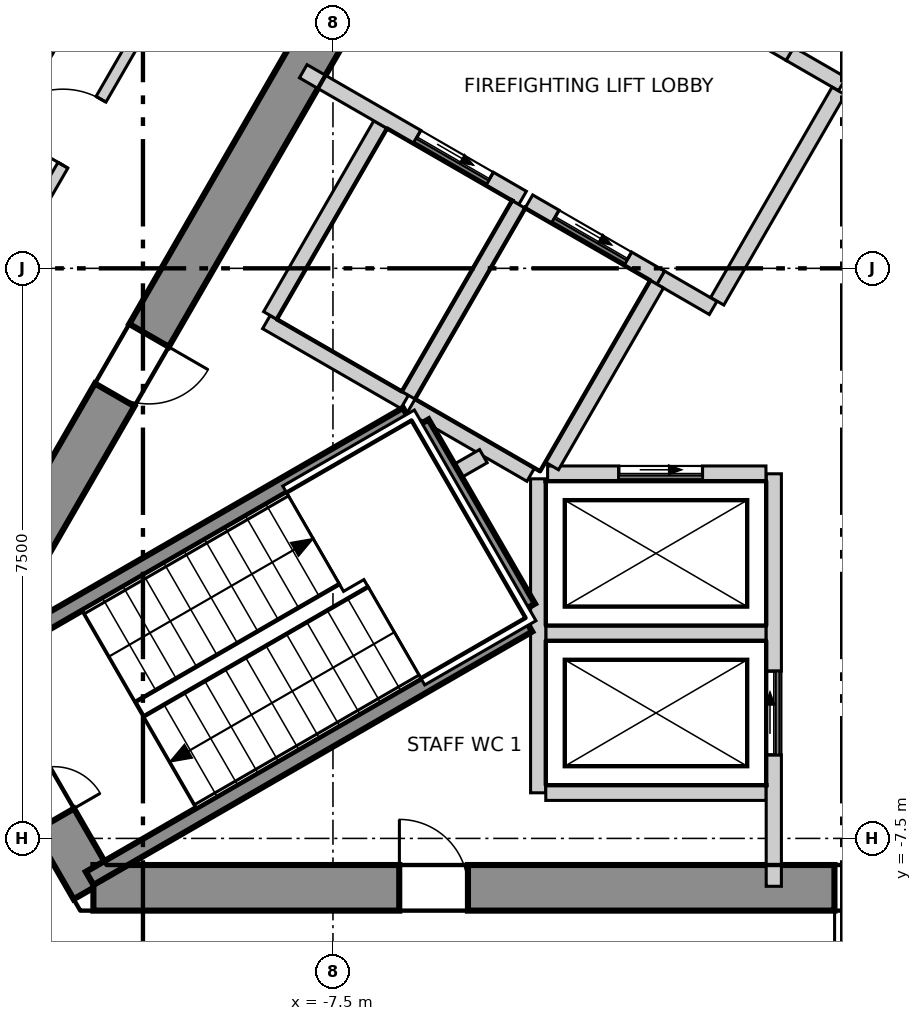
"""IFC4 building model, lengths in metres.
Left out: names, types, materials, properties, quantities, classifications, styles, units other than length and angle.
Written with IfcOpenShell. Run it as: python <this file> out.ifc"""

import sys

from ifc_helpers import new_model, si_unit, direction, frame, frame_2d, origin, place, context, subcontext, project, spatial, polyline, rectangle, outline, extrude, element, fill, save


model = new_model("IFC4")
c1 = context("Model", 3, precision=1e-05, world=origin(), true_north=direction((0.0, 1.0)))
c2 = subcontext(c1, "Body", "Model", "MODEL_VIEW")
j1 = project(units=[si_unit("LENGTHUNIT", "METRE"), si_unit("PLANEANGLEUNIT", "RADIAN")], contexts=[c1])
p1 = place(None, origin())
s1 = spatial("IfcSite", under=j1, at=p1, CompositionType="ELEMENT")
p2 = place(p1, origin())
s2 = spatial("IfcBuilding", under=s1, at=p2, CompositionType="ELEMENT")
p3 = place(p2, frame((0.0, 0.0, 300.7)))
s3 = spatial("IfcBuildingStorey", under=s2, at=p3, CompositionType="ELEMENT", Elevation=300.7)
p4 = place(p3, frame((-1.732, 13.3, -0.3), z_axis=(0.0, 0.0, 1.0), x_axis=(-0.500000539815, -0.866025092122, 0.0)))
e1 = element("IfcWall", 1, at=p4, inside=s3, PredefinedType="SHEAR", context=c2, shape_type="SweptSolid", body=[
    extrude(outline(polyline([(-0.173, -0.3), (1.795, -0.3), (3.763, -0.3), (5.732, -0.3), (7.7, -0.3), (9.668, -0.301), (11.637, -0.301), (13.605, -0.301), (15.573, -0.301), (17.542, -0.301), (19.51, -0.301), (21.478, -0.301), (21.131, 0.3), (19.226, 0.3), (17.321, 0.3), (15.415, 0.3), (13.51, 0.3), (11.605, 0.3), (9.699, 0.3), (7.794, 0.3), (5.889, 0.3), (3.984, 0.3), (2.078, 0.3), (0.173, 0.3), (-0.173, -0.3)])), origin(), (0.0, 0.0, 1.0), 3.6),
])
p5 = place(p4, frame((10.102, 0.0, 0.3)))
e2 = element("IfcOpeningElement", 2, at=p5, cuts=e1, PredefinedType="OPENING", context=c2, shape_type="SweptSolid", body=[
    extrude(rectangle(XDim=1.1, YDim=2.1, at=frame_2d((0.55, 1.05))), frame((0.0, 0.31, 0.0), z_axis=(0.0, -1.0, 0.0), x_axis=(1.0, 0.0, 0.0)), (0.0, 0.0, 1.0), 0.621),
])
p6 = place(p4, frame((16.378, 0.0, 0.3)))
e3 = element("IfcOpeningElement", 3, at=p6, cuts=e1, PredefinedType="OPENING", context=c2, shape_type="SweptSolid", body=[
    extrude(rectangle(XDim=0.9, YDim=2.1, at=frame_2d((0.45, 1.05))), frame((0.0, 0.31, 0.0), z_axis=(0.0, -1.0, 0.0), x_axis=(1.0, 0.0, 0.0)), (0.0, 0.0, 1.0), 0.621),
])
p7 = place(p4, frame((4.026, 0.0, 0.3)))
e4 = element("IfcOpeningElement", 4, at=p7, cuts=e1, PredefinedType="OPENING", context=c2, shape_type="SweptSolid", body=[
    extrude(rectangle(XDim=0.9, YDim=2.1, at=frame_2d((0.45, 1.05))), frame((0.0, 0.31, 0.0), z_axis=(0.0, -1.0, 0.0), x_axis=(1.0, 0.0, 0.0)), (0.0, 0.0, 1.0), 0.621),
])
p8 = place(p3, frame((-12.384, -5.15, -0.3), z_axis=(0.0, 0.0, 1.0), x_axis=(0.49997462182, -0.866040055388, 0.0)))
e5 = element("IfcWall", 5, at=p8, inside=s3, PredefinedType="SHEAR", context=c2, shape_type="SweptSolid", body=[
    extrude(outline(polyline([(-0.173, -0.301), (1.732, -0.301), (3.637, -0.3), (3.291, 0.3), (1.732, 0.3), (0.173, 0.3), (-0.173, -0.301)])), origin(), (0.0, 0.0, 1.0), 3.6),
])
p9 = place(p8, frame((1.032, 0.0, 0.3)))
e6 = element("IfcOpeningElement", 6, at=p9, cuts=e5, PredefinedType="OPENING", context=c2, shape_type="SweptSolid", body=[
    extrude(rectangle(XDim=1.4, YDim=2.1, at=frame_2d((0.7, 1.05))), frame((0.0, 0.31, 0.0), z_axis=(0.0, -1.0, 0.0), x_axis=(1.0, 0.0, 0.0)), (0.0, 0.0, 1.0), 0.621),
])
p10 = place(p3, frame((-10.652, -8.15, -0.3), z_axis=(0.0, 0.0, 1.0), x_axis=(1.0, 0.0, 0.0)))
e7 = element("IfcWall", 7, at=p10, inside=s3, PredefinedType="SHEAR", context=c2, shape_type="SweptSolid", body=[
    extrude(outline(polyline([(-0.173, -0.3), (1.795, -0.3), (3.763, -0.3), (5.731, -0.3), (7.7, -0.3), (9.668, -0.3), (11.636, -0.3), (13.604, -0.3), (15.573, -0.3), (17.541, -0.3), (19.509, -0.3), (21.477, -0.3), (21.131, 0.3), (19.226, 0.3), (17.321, 0.3), (15.415, 0.3), (13.51, 0.3), (11.605, 0.3), (9.699, 0.3), (7.794, 0.3), (5.889, 0.3), (3.984, 0.3), (2.078, 0.3), (0.173, 0.3), (-0.173, -0.3)])), origin(), (0.0, 0.0, 1.0), 3.6),
])
p11 = place(p10, frame((9.752, 0.0, 0.3)))
e8 = element("IfcOpeningElement", 8, at=p11, cuts=e7, PredefinedType="OPENING", context=c2, shape_type="SweptSolid", body=[
    extrude(rectangle(XDim=1.8, YDim=2.1, at=frame_2d((0.9, 1.05))), frame((0.0, 0.31, 0.0), z_axis=(0.0, -1.0, 0.0), x_axis=(1.0, 0.0, 0.0)), (0.0, 0.0, 1.0), 0.62),
])
p12 = place(p10, frame((4.026, 0.0, 0.3)))
e9 = element("IfcOpeningElement", 9, at=p12, cuts=e7, PredefinedType="OPENING", context=c2, shape_type="SweptSolid", body=[
    extrude(rectangle(XDim=0.9, YDim=2.1, at=frame_2d((0.45, 1.05))), frame((0.0, 0.31, 0.0), z_axis=(0.0, -1.0, 0.0), x_axis=(1.0, 0.0, 0.0)), (0.0, 0.0, 1.0), 0.62),
])
p13 = place(p10, frame((16.378, 0.0, 0.3)))
e10 = element("IfcOpeningElement", 10, at=p13, cuts=e7, PredefinedType="OPENING", context=c2, shape_type="SweptSolid", body=[
    extrude(rectangle(XDim=0.9, YDim=2.1, at=frame_2d((0.45, 1.05))), frame((0.0, 0.31, 0.0), z_axis=(0.0, -1.0, 0.0), x_axis=(1.0, 0.0, 0.0)), (0.0, 0.0, 1.0), 0.62),
])
p14 = place(p3, frame((-2.453, 27.405, 0.0), z_axis=(0.0, 0.0, 1.0), x_axis=(-0.500000041859, -0.866025379617, 0.0)))
e11 = element("IfcWall", 11, at=p14, inside=s3, PredefinedType="ELEMENTEDWALL", context=c2, shape_type="SweptSolid", body=[
    extrude(rectangle(XDim=44.994, YDim=0.2, at=frame_2d((22.497, 0.0))), origin(), (0.0, 0.0, 1.0), 3.3),
])
p15 = place(p14, frame((2.103, 0.0, 0.9)))
e12 = element("IfcOpeningElement", 12, at=p15, cuts=e11, PredefinedType="OPENING", context=c2, shape_type="SweptSolid", body=[
    extrude(rectangle(XDim=3.7, YDim=2.2, at=frame_2d((1.85, 1.1))), frame((0.0, 0.11, 0.0), z_axis=(0.0, -1.0, 0.0), x_axis=(1.0, 0.0, 0.0)), (0.0, 0.0, 1.0), 0.22),
])
p16 = place(p14, frame((7.404, 0.0, 0.9)))
e13 = element("IfcOpeningElement", 13, at=p16, cuts=e11, PredefinedType="OPENING", context=c2, shape_type="SweptSolid", body=[
    extrude(rectangle(XDim=3.7, YDim=2.2, at=frame_2d((1.85, 1.1))), frame((0.0, 0.11, 0.0), z_axis=(0.0, -1.0, 0.0), x_axis=(1.0, 0.0, 0.0)), (0.0, 0.0, 1.0), 0.22),
])
p17 = place(p14, frame((12.705, 0.0, 0.9)))
e14 = element("IfcOpeningElement", 14, at=p17, cuts=e11, PredefinedType="OPENING", context=c2, shape_type="SweptSolid", body=[
    extrude(rectangle(XDim=3.7, YDim=2.2, at=frame_2d((1.85, 1.1))), frame((0.0, 0.11, 0.0), z_axis=(0.0, -1.0, 0.0), x_axis=(1.0, 0.0, 0.0)), (0.0, 0.0, 1.0), 0.22),
])
p18 = place(p14, frame((18.006, 0.0, 0.9)))
e15 = element("IfcOpeningElement", 15, at=p18, cuts=e11, PredefinedType="OPENING", context=c2, shape_type="SweptSolid", body=[
    extrude(rectangle(XDim=3.7, YDim=2.2, at=frame_2d((1.85, 1.1))), frame((0.0, 0.11, 0.0), z_axis=(0.0, -1.0, 0.0), x_axis=(1.0, 0.0, 0.0)), (0.0, 0.0, 1.0), 0.22),
])
p19 = place(p14, frame((23.307, 0.0, 0.9)))
e16 = element("IfcOpeningElement", 16, at=p19, cuts=e11, PredefinedType="OPENING", context=c2, shape_type="SweptSolid", body=[
    extrude(rectangle(XDim=3.7, YDim=2.2, at=frame_2d((1.85, 1.1))), frame((0.0, 0.11, 0.0), z_axis=(0.0, -1.0, 0.0), x_axis=(1.0, 0.0, 0.0)), (0.0, 0.0, 1.0), 0.22),
])
p20 = place(p14, frame((28.608, 0.0, 0.9)))
e17 = element("IfcOpeningElement", 17, at=p20, cuts=e11, PredefinedType="OPENING", context=c2, shape_type="SweptSolid", body=[
    extrude(rectangle(XDim=3.7, YDim=2.2, at=frame_2d((1.85, 1.1))), frame((0.0, 0.11, 0.0), z_axis=(0.0, -1.0, 0.0), x_axis=(1.0, 0.0, 0.0)), (0.0, 0.0, 1.0), 0.22),
])
p21 = place(p14, frame((33.909, 0.0, 0.9)))
e18 = element("IfcOpeningElement", 18, at=p21, cuts=e11, PredefinedType="OPENING", context=c2, shape_type="SweptSolid", body=[
    extrude(rectangle(XDim=3.7, YDim=2.2, at=frame_2d((1.85, 1.1))), frame((0.0, 0.11, 0.0), z_axis=(0.0, -1.0, 0.0), x_axis=(1.0, 0.0, 0.0)), (0.0, 0.0, 1.0), 0.22),
])
p22 = place(p14, frame((39.21, 0.0, 0.9)))
e19 = element("IfcOpeningElement", 19, at=p22, cuts=e11, PredefinedType="OPENING", context=c2, shape_type="SweptSolid", body=[
    extrude(rectangle(XDim=3.7, YDim=2.2, at=frame_2d((1.85, 1.1))), frame((0.0, 0.11, 0.0), z_axis=(0.0, -1.0, 0.0), x_axis=(1.0, 0.0, 0.0)), (0.0, 0.0, 1.0), 0.22),
])
p23 = place(p3, frame((-17.679, -10.12, 0.0), z_axis=(0.0, 0.0, 1.0), x_axis=(0.500008955215, 0.866020233427, 0.0)))
e20 = element("IfcWall", 20, at=p23, inside=s3, PredefinedType="PARTITIONING", context=c2, shape_type="SweptSolid", body=[
    extrude(rectangle(XDim=35.357, YDim=0.15, at=frame_2d((17.679, 0.0))), origin(), (0.0, 0.0, 1.0), 3.3),
])
p24 = place(p23, frame((31.307, 0.0, 0.0)))
e21 = element("IfcOpeningElement", 21, at=p24, cuts=e20, PredefinedType="OPENING", context=c2, shape_type="SweptSolid", body=[
    extrude(rectangle(XDim=1.0, YDim=2.1, at=frame_2d((0.5, 1.05))), frame((0.0, 0.085, 0.0), z_axis=(0.0, -1.0, 0.0), x_axis=(1.0, 0.0, 0.0)), (0.0, 0.0, 1.0), 0.17),
])
p25 = place(p23, frame((20.056, 0.0, 0.0)))
e22 = element("IfcOpeningElement", 22, at=p25, cuts=e20, PredefinedType="OPENING", context=c2, shape_type="SweptSolid", body=[
    extrude(rectangle(XDim=1.0, YDim=2.1, at=frame_2d((0.5, 1.05))), frame((0.0, 0.085, 0.0), z_axis=(0.0, -1.0, 0.0), x_axis=(1.0, 0.0, 0.0)), (0.0, 0.0, 1.0), 0.17),
])
p26 = place(p23, frame((13.253, 0.0, 0.0)))
e23 = element("IfcOpeningElement", 23, at=p26, cuts=e20, PredefinedType="OPENING", context=c2, shape_type="SweptSolid", body=[
    extrude(rectangle(XDim=1.0, YDim=2.1, at=frame_2d((0.5, 1.05))), frame((0.0, 0.085, 0.0), z_axis=(0.0, -1.0, 0.0), x_axis=(1.0, 0.0, 0.0)), (0.0, 0.0, 1.0), 0.17),
])
p27 = place(p23, frame((7.653, 0.0, 0.0)))
e24 = element("IfcOpeningElement", 24, at=p27, cuts=e20, PredefinedType="OPENING", context=c2, shape_type="SweptSolid", body=[
    extrude(rectangle(XDim=1.0, YDim=2.1, at=frame_2d((0.5, 1.05))), frame((0.0, 0.085, 0.0), z_axis=(0.0, -1.0, 0.0), x_axis=(1.0, 0.0, 0.0)), (0.0, 0.0, 1.0), 0.17),
])
p28 = place(p23, frame((2.952, 0.0, 0.0)))
e25 = element("IfcOpeningElement", 25, at=p28, cuts=e20, PredefinedType="OPENING", context=c2, shape_type="SweptSolid", body=[
    extrude(rectangle(XDim=1.0, YDim=2.1, at=frame_2d((0.5, 1.05))), frame((0.0, 0.085, 0.0), z_axis=(0.0, -1.0, 0.0), x_axis=(1.0, 0.0, 0.0)), (0.0, 0.0, 1.0), 0.17),
])
p29 = place(p3, frame((-8.376, -0.707, 0.0), z_axis=(0.0, 0.0, 1.0), x_axis=(0.866067520717, -0.499927044236, 0.0)))
e26 = element("IfcWall", 26, at=p29, inside=s3, PredefinedType="SOLIDWALL", context=c2, shape_type="SweptSolid", body=[
    extrude(rectangle(XDim=2.1, YDim=0.2, at=frame_2d((1.05, 0.0))), origin(), (0.0, 0.0, 1.0), 3.3),
])
p30 = place(p3, frame((-8.326, -0.62, 0.0), z_axis=(0.0, 0.0, 1.0), x_axis=(0.500023687443, 0.866011727401, 0.0)))
e27 = element("IfcWall", 27, at=p30, inside=s3, PredefinedType="SOLIDWALL", context=c2, shape_type="SweptSolid", body=[
    extrude(rectangle(XDim=2.9, YDim=0.2, at=frame_2d((1.45, 0.0))), origin(), (0.0, 0.0, 1.0), 3.3),
])
p31 = place(p3, frame((-4.7, -4.8, 0.0), z_axis=(0.0, 0.0, 1.0), x_axis=(1.0, 0.0, 0.0)))
e28 = element("IfcWall", 28, at=p31, inside=s3, PredefinedType="SOLIDWALL", context=c2, shape_type="SweptSolid", body=[
    extrude(rectangle(XDim=2.9, YDim=0.2, at=frame_2d((1.45, 0.0))), origin(), (0.0, 0.0, 1.0), 3.3),
])
p32 = place(p3, frame((-4.8, -6.9, 0.0), z_axis=(0.0, 0.0, 1.0), x_axis=(0.0, 1.0, 0.0)))
e29 = element("IfcWall", 29, at=p32, inside=s3, PredefinedType="SOLIDWALL", context=c2, shape_type="SweptSolid", body=[
    extrude(rectangle(XDim=4.131, YDim=0.2, at=frame_2d((2.065, 0.0))), origin(), (0.0, 0.0, 1.0), 3.3),
])
p33 = place(p3, frame((-4.7, -6.9, 0.0), z_axis=(0.0, 0.0, 1.0), x_axis=(1.0, 0.0, 0.0)))
e30 = element("IfcWall", 30, at=p33, inside=s3, PredefinedType="SOLIDWALL", context=c2, shape_type="SweptSolid", body=[
    extrude(rectangle(XDim=2.9, YDim=0.2, at=frame_2d((1.45, 0.0))), origin(), (0.0, 0.0, 1.0), 3.3),
])
p34 = place(p3, frame((-1.7, -8.13, 0.0), z_axis=(0.0, 0.0, 1.0), x_axis=(0.0, 1.0, 0.0)))
e31 = element("IfcWall", 31, at=p34, inside=s3, PredefinedType="SOLIDWALL", context=c2, shape_type="SweptSolid", body=[
    extrude(rectangle(XDim=5.427, YDim=0.2, at=frame_2d((2.713, 0.0))), origin(), (0.0, 0.0, 1.0), 3.3),
])
p35 = place(p34, frame((1.73, 0.0, 0.0)))
e32 = element("IfcOpeningElement", 32, at=p35, cuts=e31, PredefinedType="OPENING", context=c2, shape_type="SweptSolid", body=[
    extrude(rectangle(XDim=1.1, YDim=2.1, at=frame_2d((0.55, 1.05))), frame((0.0, 0.11, 0.0), z_axis=(0.0, -1.0, 0.0), x_axis=(1.0, 0.0, 0.0)), (0.0, 0.0, 1.0), 0.22),
])
p36 = place(p3, frame((-4.676, -2.7, 0.0), z_axis=(0.0, 0.0, 1.0), x_axis=(1.0, 0.0, 0.0)))
e33 = element("IfcWall", 33, at=p36, inside=s3, PredefinedType="SOLIDWALL", context=c2, shape_type="SweptSolid", body=[
    extrude(rectangle(XDim=2.873, YDim=0.2, at=frame_2d((1.437, 0.0))), origin(), (0.0, 0.0, 1.0), 3.3),
])
p37 = place(p36, frame((0.937, 0.0, 0.0)))
e34 = element("IfcOpeningElement", 34, at=p37, cuts=e33, PredefinedType="OPENING", context=c2, shape_type="SweptSolid", body=[
    extrude(rectangle(XDim=1.1, YDim=2.1, at=frame_2d((0.55, 1.05))), frame((0.0, 0.11, 0.0), z_axis=(0.0, -1.0, 0.0), x_axis=(1.0, 0.0, 0.0)), (0.0, 0.0, 1.0), 0.22),
])
p38 = place(p3, frame((-7.891, 2.593, 0.0), z_axis=(0.0, 0.0, 1.0), x_axis=(0.866070917804, -0.499921159118, 0.0)))
e35 = element("IfcWall", 35, at=p38, inside=s3, PredefinedType="SOLIDWALL", context=c2, shape_type="SweptSolid", body=[
    extrude(rectangle(XDim=3.333, YDim=0.2, at=frame_2d((1.666, 0.0))), origin(), (0.0, 0.0, 1.0), 3.3),
])
p39 = place(p38, frame((1.73, 0.0, 0.0)))
e36 = element("IfcOpeningElement", 36, at=p39, cuts=e35, PredefinedType="OPENING", context=c2, shape_type="SweptSolid", body=[
    extrude(rectangle(XDim=1.1, YDim=2.1, at=frame_2d((0.55, 1.05))), frame((0.0, 0.11, 0.0), z_axis=(0.0, -1.0, 0.0), x_axis=(1.0, 0.0, 0.0)), (0.0, 0.0, 1.0), 0.22),
])
p40 = place(p3, frame((-3.188, -0.122, 0.0), z_axis=(0.0, 0.0, 1.0), x_axis=(0.865705793592, -0.50055317294, 0.0)))
e37 = element("IfcWall", 37, at=p40, inside=s3, PredefinedType="SOLIDWALL", context=c2, shape_type="SweptSolid", body=[
    extrude(rectangle(XDim=0.797, YDim=0.2, at=frame_2d((0.398, 0.0))), origin(), (0.0, 0.0, 1.0), 3.3),
])
p41 = place(p3, frame((-1.488, 2.822, 0.0), z_axis=(0.0, 0.0, 1.0), x_axis=(0.866236612152, -0.499633997809, 0.0)))
e38 = element("IfcWall", 38, at=p41, inside=s3, PredefinedType="SOLIDWALL", context=c2, shape_type="SweptSolid", body=[
    extrude(rectangle(XDim=0.796, YDim=0.2, at=frame_2d((0.398, 0.0))), origin(), (0.0, 0.0, 1.0), 3.3),
])
p42 = place(p3, frame((-2.444, -0.433, 0.0), z_axis=(0.0, 0.0, 1.0), x_axis=(0.500035624827, 0.866004834804, 0.0)))
e39 = element("IfcWall", 39, at=p42, inside=s3, PredefinedType="SOLIDWALL", context=c2, shape_type="SweptSolid", body=[
    extrude(rectangle(XDim=3.194, YDim=0.2, at=frame_2d((1.597, 0.0))), origin(), (0.0, 0.0, 1.0), 3.3),
])
p43 = place(p3, frame((-6.507, -1.67, 0.0), z_axis=(0.0, 0.0, 1.0), x_axis=(0.50012328804, 0.865954211699, 0.0)))
e40 = element("IfcWall", 40, at=p43, inside=s3, PredefinedType="SOLIDWALL", context=c2, shape_type="SweptSolid", body=[
    extrude(rectangle(XDim=2.9, YDim=0.2, at=frame_2d((1.45, 0.0))), origin(), (0.0, 0.0, 1.0), 3.3),
])
p44 = place(p3, frame((-6.47, -1.807, 0.0), z_axis=(0.0, 0.0, 1.0), x_axis=(0.865883195159, -0.500246231712, 0.0)))
e41 = element("IfcWall", 41, at=p44, inside=s3, PredefinedType="SOLIDWALL", context=c2, shape_type="SweptSolid", body=[
    extrude(rectangle(XDim=1.815, YDim=0.2, at=frame_2d((0.908, 0.0))), origin(), (0.0, 0.0, 1.0), 3.3),
])
p45 = place(p3, frame((-4.922, 0.879, 0.0), z_axis=(0.0, 0.0, 1.0), x_axis=(0.866073918653, -0.499915960366, 0.0)))
e42 = element("IfcWall", 42, at=p45, inside=s3, PredefinedType="SOLIDWALL", context=c2, shape_type="SweptSolid", body=[
    extrude(rectangle(XDim=2.002, YDim=0.2, at=frame_2d((1.001, 0.0))), origin(), (0.0, 0.0, 1.0), 3.3),
])
p46 = place(p45, frame((0.402, 0.0, 0.0)))
e43 = element("IfcOpeningElement", 43, at=p46, cuts=e42, PredefinedType="OPENING", context=c2, shape_type="SweptSolid", body=[
    extrude(rectangle(XDim=1.1, YDim=2.1, at=frame_2d((0.55, 1.05))), frame((0.0, 0.11, 0.0), z_axis=(0.0, -1.0, 0.0), x_axis=(1.0, 0.0, 0.0)), (0.0, 0.0, 1.0), 0.22),
])
p47 = place(p3, frame((-4.619, -2.6, 0.0), z_axis=(0.0, 0.0, 1.0), x_axis=(0.50009492287, 0.865970593103, 0.0)))
e44 = element("IfcWall", 44, at=p47, inside=s3, PredefinedType="SOLIDWALL", context=c2, shape_type="SweptSolid", body=[
    extrude(rectangle(XDim=2.761, YDim=0.2, at=frame_2d((1.381, 0.0))), origin(), (0.0, 0.0, 1.0), 3.3),
])
p48 = place(p3, frame((-3.309, 3.873, 0.0), z_axis=(0.0, 0.0, 1.0), x_axis=(0.866098583652, -0.499873227325, 0.0)))
e45 = element("IfcWall", 45, at=p48, inside=s3, PredefinedType="SOLIDWALL", context=c2, shape_type="SweptSolid", body=[
    extrude(rectangle(XDim=2.103, YDim=0.2, at=frame_2d((1.051, 0.0))), origin(), (0.0, 0.0, 1.0), 3.3),
])
p49 = place(p48, frame((0.502, 0.0, 0.0)))
e46 = element("IfcOpeningElement", 46, at=p49, cuts=e45, PredefinedType="OPENING", context=c2, shape_type="SweptSolid", body=[
    extrude(rectangle(XDim=1.1, YDim=2.1, at=frame_2d((0.55, 1.05))), frame((0.0, 0.11, 0.0), z_axis=(0.0, -1.0, 0.0), x_axis=(1.0, 0.0, 0.0)), (0.0, 0.0, 1.0), 0.22),
])
p50 = place(p3, frame((-5.853, -2.662, 0.0), z_axis=(0.0, 0.0, 1.0), x_axis=(0.866630806644, 0.498949942355, 0.0)))
e47 = element("IfcWall", 47, at=p50, inside=s3, PredefinedType="SOLIDWALL", context=c2, shape_type="SweptSolid", body=[
    extrude(rectangle(XDim=0.383, YDim=0.2, at=frame_2d((0.191, 0.0))), origin(), (0.0, 0.0, 1.0), 3.3),
])
p51 = place(p3, frame((-12.301, -5.254, 0.0), z_axis=(0.0, 0.0, 1.0), x_axis=(0.866068467981, 0.499925403204, 0.0)))
e48 = element("IfcWall", 48, at=p51, inside=s3, PredefinedType="SOLIDWALL", context=c2, shape_type="SweptSolid", body=[
    extrude(rectangle(XDim=6.665, YDim=0.2, at=frame_2d((3.332, 0.0))), origin(), (0.0, 0.0, 1.0), 3.3),
])
p52 = place(p3, frame((-6.329, -2.038, 0.0), z_axis=(0.0, 0.0, 1.0), x_axis=(0.500200581029, -0.865909567298, 0.0)))
e49 = element("IfcWall", 49, at=p52, inside=s3, PredefinedType="SOLIDWALL", context=c2, shape_type="SweptSolid", body=[
    extrude(rectangle(XDim=2.799, YDim=0.2, at=frame_2d((1.399, 0.0))), origin(), (0.0, 0.0, 1.0), 3.3),
])
p53 = place(p3, frame((-10.701, -8.026, 0.0), z_axis=(0.0, 0.0, 1.0), x_axis=(0.866005022404, 0.500035299925, 0.0)))
e50 = element("IfcWall", 50, at=p53, inside=s3, PredefinedType="SOLIDWALL", context=c2, shape_type="SweptSolid", body=[
    extrude(rectangle(XDim=6.665, YDim=0.2, at=frame_2d((3.333, 0.0))), origin(), (0.0, 0.0, 1.0), 3.3),
])
p54 = place(p37, origin())
e51 = element("IfcDoor", 51, at=p54, inside=s3, OperationType="SLIDING_TO_LEFT", PredefinedType="DOOR", context=c2, shape_type="SweptSolid", body=[
    extrude(rectangle(XDim=1.1, YDim=2.1, at=frame_2d((0.55, 1.05))), frame((0.0, 0.025, 0.0), z_axis=(0.0, -1.0, 0.0), x_axis=(1.0, 0.0, 0.0)), (0.0, 0.0, 1.0), 0.05),
])
fill(e34, e51)
p55 = place(p35, origin())
e52 = element("IfcDoor", 52, at=p55, inside=s3, OperationType="SLIDING_TO_LEFT", PredefinedType="DOOR", context=c2, shape_type="SweptSolid", body=[
    extrude(rectangle(XDim=1.1, YDim=2.1, at=frame_2d((0.55, 1.05))), frame((0.0, 0.025, 0.0), z_axis=(0.0, -1.0, 0.0), x_axis=(1.0, 0.0, 0.0)), (0.0, 0.0, 1.0), 0.05),
])
fill(e32, e52)
p56 = place(p46, origin())
e53 = element("IfcDoor", 53, at=p56, inside=s3, OperationType="SLIDING_TO_LEFT", PredefinedType="DOOR", context=c2, shape_type="SweptSolid", body=[
    extrude(rectangle(XDim=1.1, YDim=2.1, at=frame_2d((0.55, 1.05))), frame((0.0, 0.025, 0.0), z_axis=(0.0, -1.0, 0.0), x_axis=(1.0, 0.0, 0.0)), (0.0, 0.0, 1.0), 0.05),
])
fill(e43, e53)
p57 = place(p39, origin())
e54 = element("IfcDoor", 54, at=p57, inside=s3, OperationType="SLIDING_TO_LEFT", PredefinedType="DOOR", context=c2, shape_type="SweptSolid", body=[
    extrude(rectangle(XDim=1.1, YDim=2.1, at=frame_2d((0.55, 1.05))), frame((0.0, 0.025, 0.0), z_axis=(0.0, -1.0, 0.0), x_axis=(1.0, 0.0, 0.0)), (0.0, 0.0, 1.0), 0.05),
])
fill(e36, e54)
p58 = place(p26, origin())
e55 = element("IfcDoor", 55, at=p58, inside=s3, OperationType="SINGLE_SWING_RIGHT", PredefinedType="DOOR", context=c2, shape_type="SweptSolid", body=[
    extrude(rectangle(XDim=1.0, YDim=2.1, at=frame_2d((0.5, 1.05))), frame((0.0, 0.025, 0.0), z_axis=(0.0, -1.0, 0.0), x_axis=(1.0, 0.0, 0.0)), (0.0, 0.0, 1.0), 0.05),
])
fill(e23, e55)
p59 = place(p11, origin())
e56 = element("IfcDoor", 56, at=p59, inside=s3, OperationType="DOUBLE_DOOR_SINGLE_SWING", PredefinedType="DOOR", context=c2, shape_type="SweptSolid", body=[
    extrude(rectangle(XDim=1.8, YDim=2.1, at=frame_2d((0.9, 1.05))), frame((0.0, 0.025, 0.0), z_axis=(0.0, -1.0, 0.0), x_axis=(1.0, 0.0, 0.0)), (0.0, 0.0, 1.0), 0.05),
])
fill(e8, e56)
p60 = place(p9, origin())
e57 = element("IfcDoor", 57, at=p60, inside=s3, OperationType="DOUBLE_DOOR_SINGLE_SWING", PredefinedType="DOOR", context=c2, shape_type="SweptSolid", body=[
    extrude(rectangle(XDim=1.4, YDim=2.1, at=frame_2d((0.7, 1.05))), frame((0.0, 0.025, 0.0), z_axis=(0.0, -1.0, 0.0), x_axis=(1.0, 0.0, 0.0)), (0.0, 0.0, 1.0), 0.05),
])
fill(e6, e57)
p61 = place(p6, origin())
e58 = element("IfcDoor", 58, at=p61, inside=s3, OperationType="SINGLE_SWING_RIGHT", PredefinedType="DOOR", context=c2, shape_type="SweptSolid", body=[
    extrude(rectangle(XDim=0.9, YDim=2.1, at=frame_2d((0.45, 1.05))), frame((0.0, 0.025, 0.0), z_axis=(0.0, -1.0, 0.0), x_axis=(1.0, 0.0, 0.0)), (0.0, 0.0, 1.0), 0.05),
])
fill(e3, e58)
p62 = place(p12, origin())
e59 = element("IfcDoor", 59, at=p62, inside=s3, OperationType="SINGLE_SWING_RIGHT", PredefinedType="DOOR", context=c2, shape_type="SweptSolid", body=[
    extrude(rectangle(XDim=0.9, YDim=2.1, at=frame_2d((0.45, 1.05))), frame((0.0, 0.025, 0.0), z_axis=(0.0, -1.0, 0.0), x_axis=(1.0, 0.0, 0.0)), (0.0, 0.0, 1.0), 0.05),
])
fill(e9, e59)
save(model, sys.argv[1])
